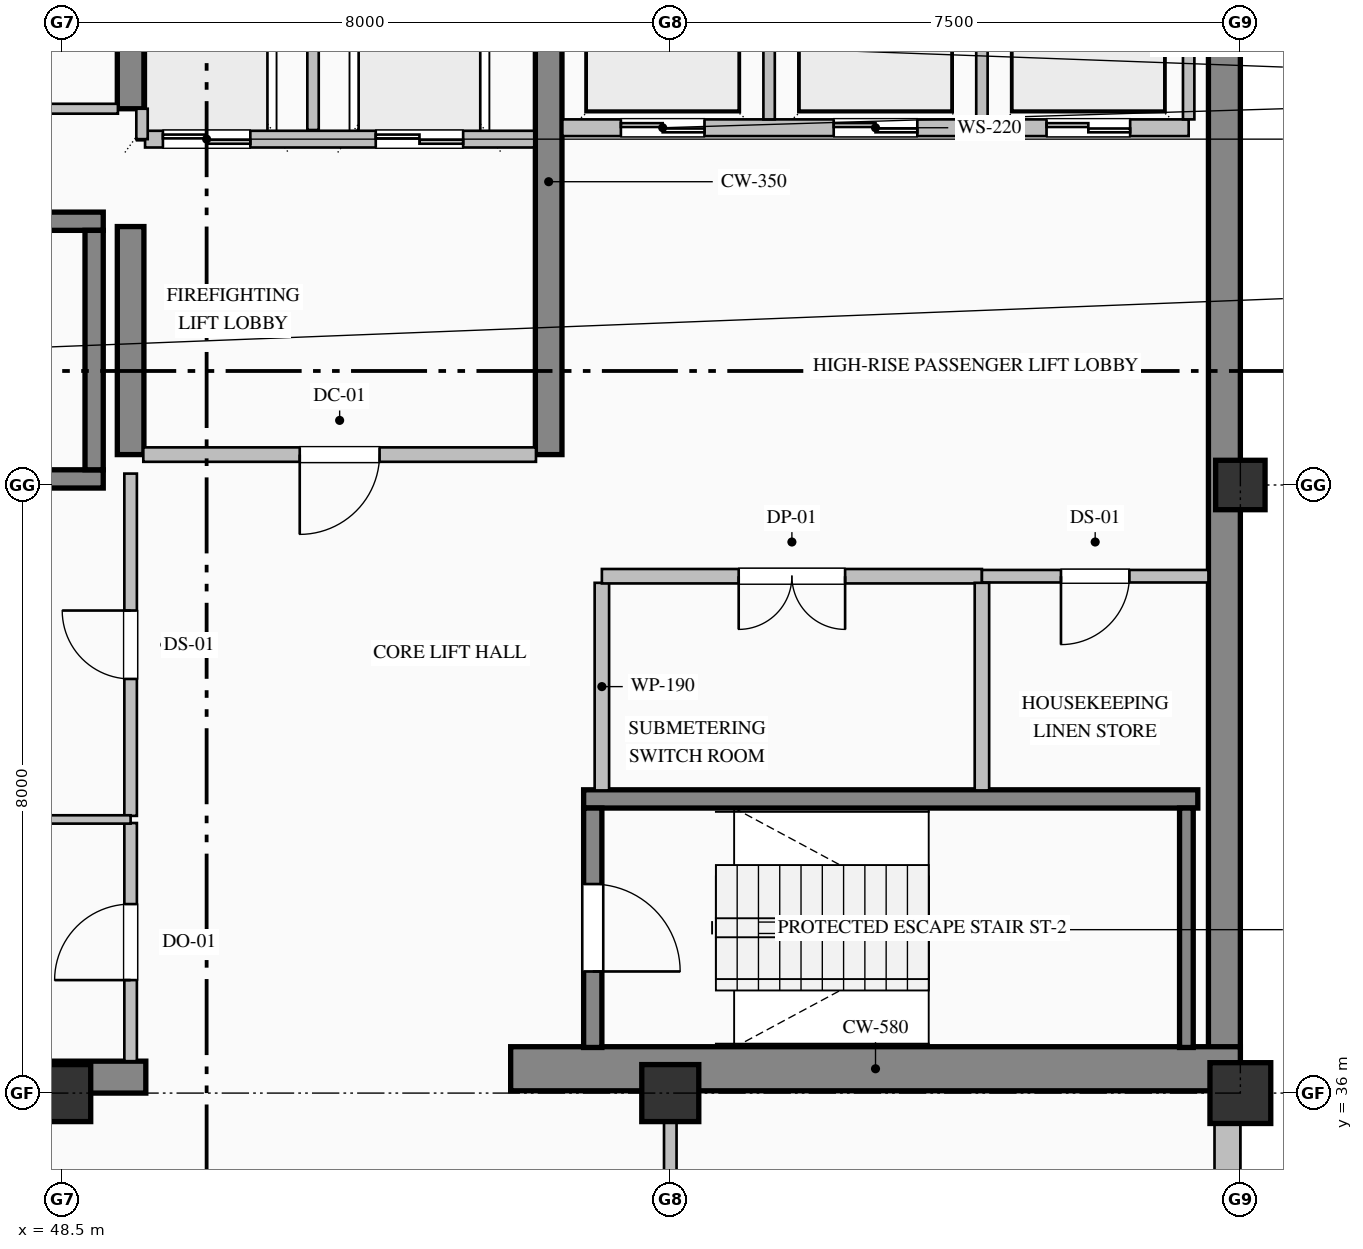
"""IFC4 building model, lengths in metres.
Left out: names, types, materials, properties, quantities, classifications, styles, units other than length and angle.
Written with IfcOpenShell. Run it as: python <this file> out.ifc"""

import sys

from ifc_helpers import new_model, si_unit, direction, frame, frame_2d, origin, origin_2d, place, context, subcontext, project, spatial, rectangle, hollow_rectangle, extrude, element, fill, save


model = new_model("IFC4")
c1 = context("Model", 3, precision=1e-05, world=origin(), true_north=direction((0.0, 1.0)))
c2 = subcontext(c1, "Body", "Model", "MODEL_VIEW")
j1 = project(units=[si_unit("LENGTHUNIT", "METRE"), si_unit("PLANEANGLEUNIT", "RADIAN")], contexts=[c1])
p1 = place(None, origin())
s1 = spatial("IfcSite", under=j1, at=p1, CompositionType="ELEMENT")
p2 = place(p1, origin())
s2 = spatial("IfcBuilding", under=s1, at=p2, CompositionType="ELEMENT")
p3 = place(p2, frame((0.0, 0.0, 343.2)))
s3 = spatial("IfcBuildingStorey", under=s2, at=p3, CompositionType="ELEMENT", Elevation=343.2)
p4 = place(p3, frame((63.79, 36.32, 0.0), z_axis=(0.0, 0.0, 1.0), x_axis=(0.0, 1.0, 0.0)))
e1 = element("IfcWall", 1, at=p4, inside=s3, PredefinedType="SHEAR", context=c2, shape_type="SweptSolid", body=[
    extrude(rectangle(XDim=15.26, YDim=0.42, at=frame_2d((7.63, 0.0))), origin(), (0.0, 0.0, 1.0), 3.785),
])
p5 = place(p3, frame((40.5, 36.21, 0.0), z_axis=(0.0, 0.0, 1.0), x_axis=(1.0, 0.0, 0.0)))
e2 = element("IfcWall", 2, at=p5, inside=s3, PredefinedType="SHEAR", context=c2, shape_type="SweptSolid", body=[
    extrude(rectangle(XDim=9.1, YDim=0.42, at=frame_2d((4.55, 0.0))), origin(), (0.0, 0.0, 1.0), 3.785),
])
p6 = place(p3, frame((54.4, 36.32, 0.0), z_axis=(0.0, 0.0, 1.0), x_axis=(1.0, 0.0, 0.0)))
e3 = element("IfcWall", 3, at=p6, inside=s3, PredefinedType="SHEAR", context=c2, shape_type="SweptSolid", body=[
    extrude(rectangle(XDim=9.6, YDim=0.58, at=frame_2d((4.8, 0.0))), origin(), (0.0, 0.0, 1.0), 4.0),
])
p7 = place(p3, frame((49.4, 44.4, 0.0), z_axis=(0.0, 0.0, 1.0), x_axis=(0.0, 1.0, 0.0)))
e4 = element("IfcWall", 4, at=p7, inside=s3, PredefinedType="SHEAR", context=c2, shape_type="SweptSolid", body=[
    extrude(rectangle(XDim=3.0, YDim=0.35, at=frame_2d((1.5, 0.0))), origin(), (0.0, 0.0, 1.0), 3.785),
])
p8 = place(p3, frame((49.4, 48.95, 0.0), z_axis=(0.0, 0.0, 1.0), x_axis=(0.0, 1.0, 0.0)))
e5 = element("IfcWall", 5, at=p8, inside=s3, PredefinedType="SHEAR", context=c2, shape_type="SweptSolid", body=[
    extrude(rectangle(XDim=2.63, YDim=0.35, at=frame_2d((1.315, 0.0))), origin(), (0.0, 0.0, 1.0), 3.785),
])
p9 = place(p3, frame((54.9, 44.4, 0.0), z_axis=(0.0, 0.0, 1.0), x_axis=(0.0, 1.0, 0.0)))
e6 = element("IfcWall", 6, at=p9, inside=s3, PredefinedType="SHEAR", context=c2, shape_type="SweptSolid", body=[
    extrude(rectangle(XDim=7.18, YDim=0.35, at=frame_2d((3.59, 0.0))), origin(), (0.0, 0.0, 1.0), 3.785),
])
for number, where, z_axis, x_axis in (
    (7, (48.5, 36.0, 0.0), (0.0, 0.0, 1.0), (1.0, 0.0, 0.0)),
    (8, (56.5, 36.0, 0.0), (0.0, 0.0, 1.0), (1.0, 0.0, 0.0)),
):
    element("IfcColumn", number, at=place(p3, frame(where, z_axis=z_axis, x_axis=x_axis)), inside=s3, PredefinedType="COLUMN", context=c2, shape_type="SweptSolid", body=[
        extrude(rectangle(XDim=0.75, YDim=0.75, at=origin_2d()), origin(), (0.0, 0.0, 1.0), 4.0),
    ])
p10 = place(p3, frame((64.0, 36.0, 0.0), z_axis=(0.0, 0.0, 1.0), x_axis=(1.0, 0.0, 0.0)))
e9 = element("IfcColumn", 9, at=p10, inside=s3, PredefinedType="COLUMN", context=c2, shape_type="SweptSolid", body=[
    extrude(hollow_rectangle(XDim=0.8, YDim=0.8, WallThickness=0.032, at=origin_2d()), origin(), (0.0, 0.0, 1.0), 4.0),
])
p11 = place(p3, frame((64.0, 44.0, 0.0), z_axis=(0.0, 0.0, 1.0), x_axis=(1.0, 0.0, 0.0)))
e10 = element("IfcColumn", 10, at=p11, inside=s3, PredefinedType="COLUMN", context=c2, shape_type="SweptSolid", body=[
    extrude(hollow_rectangle(XDim=0.65, YDim=0.65, WallThickness=0.028, at=origin_2d()), origin(), (0.0, 0.0, 1.0), 4.0),
])
p12 = place(p3, frame((63.83, 36.05, 0.0), z_axis=(0.0, 0.0, 1.0), x_axis=(0.0, -1.0, 0.0)))
e11 = element("IfcWall", 11, at=p12, inside=s3, PredefinedType="SOLIDWALL", context=c2, shape_type="SweptSolid", body=[
    extrude(rectangle(XDim=13.55, YDim=0.34, at=frame_2d((6.775, 0.0))), origin(), (0.0, 0.0, 1.0), 3.335),
])
p13 = place(p12, frame((2.925, 0.0, 0.9)))
e12 = element("IfcOpeningElement", 12, at=p13, cuts=e11, PredefinedType="OPENING", context=c2, shape_type="SweptSolid", body=[
    extrude(rectangle(XDim=1.35, YDim=1.85, at=frame_2d((0.675, 0.925))), frame((0.0, 0.18, 0.0), z_axis=(0.0, -1.0, 0.0), x_axis=(1.0, 0.0, 0.0)), (0.0, 0.0, 1.0), 0.36),
])
for number, where, z_axis, x_axis in (
    (13, (40.96, 47.47, 0.0), (0.0, 0.0, 1.0), (1.0, 0.0, 0.0)),
    (14, (49.04, 44.08, 0.0), (0.0, 0.0, 1.0), (-1.0, 0.0, 0.0)),
):
    element("IfcWall", number, at=place(p3, frame(where, z_axis=z_axis, x_axis=x_axis)), inside=s3, PredefinedType="SOLIDWALL", context=c2, shape_type="SweptSolid", body=[
        extrude(rectangle(XDim=8.08, YDim=0.24, at=frame_2d((4.04, 0.0))), origin(), (0.0, 0.0, 1.0), 4.0),
    ])
p14 = place(p3, frame((48.92, 44.2, 0.0), z_axis=(0.0, 0.0, 1.0), x_axis=(0.0, 1.0, 0.0)))
e15 = element("IfcWall", 15, at=p14, inside=s3, PredefinedType="SOLIDWALL", context=c2, shape_type="SweptSolid", body=[
    extrude(rectangle(XDim=3.15, YDim=0.24, at=frame_2d((1.575, 0.0))), origin(), (0.0, 0.0, 1.0), 4.0),
])
p15 = place(p3, frame((55.36, 39.87, 0.0), z_axis=(0.0, 0.0, 1.0), x_axis=(1.0, 0.0, 0.0)))
e16 = element("IfcWall", 16, at=p15, inside=s3, PredefinedType="SOLIDWALL", context=c2, shape_type="SweptSolid", body=[
    extrude(rectangle(XDim=8.08, YDim=0.24, at=frame_2d((4.04, 0.0))), origin(), (0.0, 0.0, 1.0), 4.0),
])
p16 = place(p3, frame((55.48, 39.75, 0.0), z_axis=(0.0, 0.0, 1.0), x_axis=(0.0, -1.0, 0.0)))
e17 = element("IfcWall", 17, at=p16, inside=s3, PredefinedType="SOLIDWALL", context=c2, shape_type="SweptSolid", body=[
    extrude(rectangle(XDim=3.15, YDim=0.24, at=frame_2d((1.575, 0.0))), origin(), (0.0, 0.0, 1.0), 4.0),
])
p17 = place(p16, frame((1.0, 0.0, 0.0)))
e18 = element("IfcOpeningElement", 18, at=p17, cuts=e17, PredefinedType="OPENING", context=c2, shape_type="SweptSolid", body=[
    extrude(rectangle(XDim=1.15, YDim=2.2, at=frame_2d((0.575, 1.1))), frame((0.0, 0.13, 0.0), z_axis=(0.0, -1.0, 0.0), x_axis=(1.0, 0.0, 0.0)), (0.0, 0.0, 1.0), 0.26),
])
p18 = place(p3, frame((63.29, 36.6, 0.0), z_axis=(0.0, 0.0, 1.0), x_axis=(0.0, 1.0, 0.0)))
e19 = element("IfcWall", 19, at=p18, inside=s3, PredefinedType="SOLIDWALL", context=c2, shape_type="SweptSolid", body=[
    extrude(rectangle(XDim=3.15, YDim=0.18, at=frame_2d((1.575, 0.0))), origin(), (0.0, 0.0, 1.0), 4.0),
])
p19 = place(p3, frame((54.71, 48.55, 0.0), z_axis=(0.0, 0.0, 1.0), x_axis=(-1.0, 0.0, 0.0)))
e20 = element("IfcWall", 20, at=p19, inside=s3, PredefinedType="PARTITIONING", context=c2, shape_type="SweptSolid", body=[
    extrude(rectangle(XDim=5.12, YDim=0.22, at=frame_2d((2.56, 0.0))), origin(), (0.0, 0.0, 1.0), 3.785),
])
p20 = place(p19, frame((3.735, 0.0, 0.0)))
e21 = element("IfcOpeningElement", 21, at=p20, cuts=e20, PredefinedType="OPENING", context=c2, shape_type="SweptSolid", body=[
    extrude(rectangle(XDim=1.15, YDim=2.2, at=frame_2d((0.575, 1.1))), frame((0.0, 0.12, 0.0), z_axis=(0.0, -1.0, 0.0), x_axis=(1.0, 0.0, 0.0)), (0.0, 0.0, 1.0), 0.24),
])
p21 = place(p19, frame((0.935, 0.0, 0.0)))
e22 = element("IfcOpeningElement", 22, at=p21, cuts=e20, PredefinedType="OPENING", context=c2, shape_type="SweptSolid", body=[
    extrude(rectangle(XDim=1.15, YDim=2.2, at=frame_2d((0.575, 1.1))), frame((0.0, 0.12, 0.0), z_axis=(0.0, -1.0, 0.0), x_axis=(1.0, 0.0, 0.0)), (0.0, 0.0, 1.0), 0.24),
])
p22 = place(p3, frame((51.8, 48.67, 0.0), z_axis=(0.0, 0.0, 1.0), x_axis=(0.0, 1.0, 0.0)))
e23 = element("IfcWall", 23, at=p22, inside=s3, PredefinedType="PARTITIONING", context=c2, shape_type="SweptSolid", body=[
    extrude(rectangle(XDim=2.91, YDim=0.15, at=frame_2d((1.455, 0.0))), origin(), (0.0, 0.0, 1.0), 3.785),
])
p23 = place(p3, frame((49.55, 48.55, 0.0), z_axis=(0.0, 0.0, 1.0), x_axis=(0.0, 1.0, 0.0)))
e24 = element("IfcWall", 24, at=p23, inside=s3, PredefinedType="PARTITIONING", context=c2, shape_type="SweptSolid", body=[
    extrude(rectangle(XDim=0.4, YDim=0.15, at=frame_2d((0.2, 0.0))), origin(), (0.0, 0.0, 1.0), 3.785),
])
p24 = place(p3, frame((63.32, 48.7, 0.0), z_axis=(0.0, 0.0, 1.0), x_axis=(-1.0, 0.0, 0.0)))
e25 = element("IfcWall", 25, at=p24, inside=s3, PredefinedType="PARTITIONING", context=c2, shape_type="SweptSolid", body=[
    extrude(rectangle(XDim=8.24, YDim=0.22, at=frame_2d((4.12, 0.0))), origin(), (0.0, 0.0, 1.0), 3.785),
])
p25 = place(p24, frame((6.37, 0.0, 0.0)))
e26 = element("IfcOpeningElement", 26, at=p25, cuts=e25, PredefinedType="OPENING", context=c2, shape_type="SweptSolid", body=[
    extrude(rectangle(XDim=1.1, YDim=2.2, at=frame_2d((0.55, 1.1))), frame((0.0, 0.12, 0.0), z_axis=(0.0, -1.0, 0.0), x_axis=(1.0, 0.0, 0.0)), (0.0, 0.0, 1.0), 0.24),
])
p26 = place(p24, frame((3.57, 0.0, 0.0)))
e27 = element("IfcOpeningElement", 27, at=p26, cuts=e25, PredefinedType="OPENING", context=c2, shape_type="SweptSolid", body=[
    extrude(rectangle(XDim=1.1, YDim=2.2, at=frame_2d((0.55, 1.1))), frame((0.0, 0.12, 0.0), z_axis=(0.0, -1.0, 0.0), x_axis=(1.0, 0.0, 0.0)), (0.0, 0.0, 1.0), 0.24),
])
p27 = place(p24, frame((0.77, 0.0, 0.0)))
e28 = element("IfcOpeningElement", 28, at=p27, cuts=e25, PredefinedType="OPENING", context=c2, shape_type="SweptSolid", body=[
    extrude(rectangle(XDim=1.1, YDim=2.2, at=frame_2d((0.55, 1.1))), frame((0.0, 0.12, 0.0), z_axis=(0.0, -1.0, 0.0), x_axis=(1.0, 0.0, 0.0)), (0.0, 0.0, 1.0), 0.24),
])
for number, where, z_axis, x_axis in (
    (29, (57.8, 48.81, 0.0), (0.0, 0.0, 1.0), (0.0, 1.0, 0.0)),
    (30, (60.6, 48.81, 0.0), (0.0, 0.0, 1.0), (0.0, 1.0, 0.0)),
    (31, (63.32, 48.81, 0.0), (0.0, 0.0, 1.0), (0.0, 1.0, 0.0)),
):
    element("IfcWall", number, at=place(p3, frame(where, z_axis=z_axis, x_axis=x_axis)), inside=s3, PredefinedType="PARTITIONING", context=c2, shape_type="SweptSolid", body=[
        extrude(rectangle(XDim=2.77, YDim=0.15, at=frame_2d((1.385, 0.0))), origin(), (0.0, 0.0, 1.0), 3.785),
    ])
p28 = place(p3, frame((43.5, 48.95, 0.0), z_axis=(0.0, 0.0, 1.0), x_axis=(1.0, 0.0, 0.0)))
e32 = element("IfcWall", 32, at=p28, inside=s3, PredefinedType="PARTITIONING", context=c2, shape_type="SweptSolid", body=[
    extrude(rectangle(XDim=5.733, YDim=0.13, at=frame_2d((2.866, 0.0))), origin(), (0.0, 0.0, 1.0), 3.785),
])
p29 = place(p28, frame((2.406, 0.0, 0.0)))
e33 = element("IfcOpeningElement", 33, at=p29, cuts=e32, PredefinedType="OPENING", context=c2, shape_type="SweptSolid", body=[
    extrude(rectangle(XDim=0.92, YDim=2.15, at=frame_2d((0.46, 1.075))), frame((0.0, 0.075, 0.0), z_axis=(0.0, -1.0, 0.0), x_axis=(1.0, 0.0, 0.0)), (0.0, 0.0, 1.0), 0.15),
])
p30 = place(p3, frame((54.733, 44.4, 0.0), z_axis=(0.0, 0.0, 1.0), x_axis=(-1.0, 0.0, 0.0)))
e34 = element("IfcWall", 34, at=p30, inside=s3, PredefinedType="PARTITIONING", context=c2, shape_type="SweptSolid", body=[
    extrude(rectangle(XDim=5.166, YDim=0.19, at=frame_2d((2.583, 0.0))), origin(), (0.0, 0.0, 1.0), 3.785),
])
p31 = place(p30, frame((2.058, 0.0, 0.0)))
e35 = element("IfcOpeningElement", 35, at=p31, cuts=e34, PredefinedType="OPENING", context=c2, shape_type="SweptSolid", body=[
    extrude(rectangle(XDim=1.05, YDim=2.15, at=frame_2d((0.525, 1.075))), frame((0.0, 0.105, 0.0), z_axis=(0.0, -1.0, 0.0), x_axis=(1.0, 0.0, 0.0)), (0.0, 0.0, 1.0), 0.21),
])
p32 = place(p3, frame((49.4, 36.42, 0.0), z_axis=(0.0, 0.0, 1.0), x_axis=(0.0, 1.0, 0.0)))
e36 = element("IfcWall", 36, at=p32, inside=s3, PredefinedType="PARTITIONING", context=c2, shape_type="SweptSolid", body=[
    extrude(rectangle(XDim=3.133, YDim=0.165, at=frame_2d((1.566, 0.0))), origin(), (0.0, 0.0, 1.0), 3.027),
])
p33 = place(p32, frame((1.066, 0.0, 0.0)))
e37 = element("IfcOpeningElement", 37, at=p33, cuts=e36, PredefinedType="OPENING", context=c2, shape_type="SweptSolid", body=[
    extrude(rectangle(XDim=1.0, YDim=2.15, at=frame_2d((0.5, 1.075))), frame((0.0, 0.093, 0.0), z_axis=(0.0, -1.0, 0.0), x_axis=(1.0, 0.0, 0.0)), (0.0, 0.0, 1.0), 0.185),
])
p34 = place(p3, frame((49.4, 39.647, 0.0), z_axis=(0.0, 0.0, 1.0), x_axis=(0.0, 1.0, 0.0)))
e38 = element("IfcWall", 38, at=p34, inside=s3, PredefinedType="PARTITIONING", context=c2, shape_type="SweptSolid", body=[
    extrude(rectangle(XDim=4.503, YDim=0.165, at=frame_2d((2.251, 0.0))), origin(), (0.0, 0.0, 1.0), 3.027),
])
p35 = place(p34, frame((1.802, 0.0, 0.0)))
e39 = element("IfcOpeningElement", 39, at=p35, cuts=e38, PredefinedType="OPENING", context=c2, shape_type="SweptSolid", body=[
    extrude(rectangle(XDim=0.9, YDim=2.15, at=frame_2d((0.45, 1.075))), frame((0.0, 0.093, 0.0), z_axis=(0.0, -1.0, 0.0), x_axis=(1.0, 0.0, 0.0)), (0.0, 0.0, 1.0), 0.185),
])
p36 = place(p3, frame((55.6, 42.713, 0.0), z_axis=(0.0, 0.0, 1.0), x_axis=(0.0, -1.0, 0.0)))
e40 = element("IfcWall", 40, at=p36, inside=s3, PredefinedType="PARTITIONING", context=c2, shape_type="SweptSolid", body=[
    extrude(rectangle(XDim=2.731, YDim=0.19, at=frame_2d((1.365, 0.0))), origin(), (0.0, 0.0, 1.0), 3.785),
])
p37 = place(p3, frame((40.92, 39.6, 0.0), z_axis=(0.0, 0.0, 1.0), x_axis=(1.0, 0.0, 0.0)))
e41 = element("IfcWall", 41, at=p37, inside=s3, PredefinedType="MOVABLE", context=c2, shape_type="SweptSolid", body=[
    extrude(rectangle(XDim=8.48, YDim=0.11, at=frame_2d((4.24, 0.0))), origin(), (0.0, 0.0, 1.0), 3.785),
])
p38 = place(p3, frame((60.6, 42.8, 0.0), z_axis=(0.0, 0.0, 1.0), x_axis=(-1.0, 0.0, 0.0)))
e42 = element("IfcWall", 42, at=p38, inside=s3, PredefinedType="PARTITIONING", context=c2, shape_type="SweptSolid", body=[
    extrude(rectangle(XDim=5.0, YDim=0.19, at=frame_2d((2.5, 0.0))), origin(), (0.0, 0.0, 1.0), 3.785),
])
p39 = place(p38, frame((1.8, 0.0, 0.0)))
e43 = element("IfcOpeningElement", 43, at=p39, cuts=e42, PredefinedType="OPENING", context=c2, shape_type="SweptSolid", body=[
    extrude(rectangle(XDim=1.4, YDim=2.25, at=frame_2d((0.7, 1.125))), frame((0.0, 0.105, 0.0), z_axis=(0.0, -1.0, 0.0), x_axis=(1.0, 0.0, 0.0)), (0.0, 0.0, 1.0), 0.21),
])
p40 = place(p3, frame((63.58, 42.8, 0.0), z_axis=(0.0, 0.0, 1.0), x_axis=(-1.0, 0.0, 0.0)))
e44 = element("IfcWall", 44, at=p40, inside=s3, PredefinedType="PARTITIONING", context=c2, shape_type="SweptSolid", body=[
    extrude(rectangle(XDim=2.98, YDim=0.165, at=frame_2d((1.49, 0.0))), origin(), (0.0, 0.0, 1.0), 3.785),
])
p41 = place(p40, frame((1.04, 0.0, 0.0)))
e45 = element("IfcOpeningElement", 45, at=p41, cuts=e44, PredefinedType="OPENING", context=c2, shape_type="SweptSolid", body=[
    extrude(rectangle(XDim=0.9, YDim=2.15, at=frame_2d((0.45, 1.075))), frame((0.0, 0.093, 0.0), z_axis=(0.0, -1.0, 0.0), x_axis=(1.0, 0.0, 0.0)), (0.0, 0.0, 1.0), 0.185),
])
p42 = place(p3, frame((60.6, 42.713, 0.0), z_axis=(0.0, 0.0, 1.0), x_axis=(0.0, -1.0, 0.0)))
e46 = element("IfcWall", 46, at=p42, inside=s3, PredefinedType="PARTITIONING", context=c2, shape_type="SweptSolid", body=[
    extrude(rectangle(XDim=2.731, YDim=0.19, at=frame_2d((1.365, 0.0))), origin(), (0.0, 0.0, 1.0), 3.785),
])
p43 = place(p3, frame((56.5, 36.0, 0.0), z_axis=(0.0, 0.0, 1.0), x_axis=(0.0, -1.0, 0.0)))
e47 = element("IfcWall", 47, at=p43, inside=s3, PredefinedType="PARTITIONING", context=c2, shape_type="SweptSolid", body=[
    extrude(rectangle(XDim=2.325, YDim=0.165, at=frame_2d((1.163, 0.0))), origin(), (0.0, 0.0, 1.0), 3.177),
])
p44 = place(p17, origin())
e48 = element("IfcDoor", 48, at=p44, inside=s3, OperationType="SINGLE_SWING_RIGHT", PredefinedType="DOOR", context=c2, shape_type="SweptSolid", body=[
    extrude(rectangle(XDim=1.15, YDim=2.2, at=frame_2d((0.575, 1.1))), frame((0.0, 0.025, 0.0), z_axis=(0.0, -1.0, 0.0), x_axis=(1.0, 0.0, 0.0)), (0.0, 0.0, 1.0), 0.05),
])
fill(e18, e48)
p45 = place(p20, origin())
e49 = element("IfcDoor", 49, at=p45, inside=s3, OperationType="DOUBLE_DOOR_SLIDING", PredefinedType="DOOR", context=c2, shape_type="SweptSolid", body=[
    extrude(rectangle(XDim=1.15, YDim=2.2, at=frame_2d((0.575, 1.1))), frame((0.0, 0.025, 0.0), z_axis=(0.0, -1.0, 0.0), x_axis=(1.0, 0.0, 0.0)), (0.0, 0.0, 1.0), 0.05),
])
fill(e21, e49)
p46 = place(p21, origin())
e50 = element("IfcDoor", 50, at=p46, inside=s3, OperationType="DOUBLE_DOOR_SLIDING", PredefinedType="DOOR", context=c2, shape_type="SweptSolid", body=[
    extrude(rectangle(XDim=1.15, YDim=2.2, at=frame_2d((0.575, 1.1))), frame((0.0, 0.025, 0.0), z_axis=(0.0, -1.0, 0.0), x_axis=(1.0, 0.0, 0.0)), (0.0, 0.0, 1.0), 0.05),
])
fill(e22, e50)
p47 = place(p25, origin())
e51 = element("IfcDoor", 51, at=p47, inside=s3, OperationType="DOUBLE_DOOR_SLIDING", PredefinedType="DOOR", context=c2, shape_type="SweptSolid", body=[
    extrude(rectangle(XDim=1.1, YDim=2.2, at=frame_2d((0.55, 1.1))), frame((0.0, 0.025, 0.0), z_axis=(0.0, -1.0, 0.0), x_axis=(1.0, 0.0, 0.0)), (0.0, 0.0, 1.0), 0.05),
])
fill(e26, e51)
p48 = place(p26, origin())
e52 = element("IfcDoor", 52, at=p48, inside=s3, OperationType="DOUBLE_DOOR_SLIDING", PredefinedType="DOOR", context=c2, shape_type="SweptSolid", body=[
    extrude(rectangle(XDim=1.1, YDim=2.2, at=frame_2d((0.55, 1.1))), frame((0.0, 0.025, 0.0), z_axis=(0.0, -1.0, 0.0), x_axis=(1.0, 0.0, 0.0)), (0.0, 0.0, 1.0), 0.05),
])
fill(e27, e52)
p49 = place(p27, origin())
e53 = element("IfcDoor", 53, at=p49, inside=s3, OperationType="DOUBLE_DOOR_SLIDING", PredefinedType="DOOR", context=c2, shape_type="SweptSolid", body=[
    extrude(rectangle(XDim=1.1, YDim=2.2, at=frame_2d((0.55, 1.1))), frame((0.0, 0.025, 0.0), z_axis=(0.0, -1.0, 0.0), x_axis=(1.0, 0.0, 0.0)), (0.0, 0.0, 1.0), 0.05),
])
fill(e28, e53)
p50 = place(p31, origin())
e54 = element("IfcDoor", 54, at=p50, inside=s3, OperationType="SINGLE_SWING_RIGHT", PredefinedType="DOOR", context=c2, shape_type="SweptSolid", body=[
    extrude(rectangle(XDim=1.05, YDim=2.15, at=frame_2d((0.525, 1.075))), frame((0.0, 0.025, 0.0), z_axis=(0.0, -1.0, 0.0), x_axis=(1.0, 0.0, 0.0)), (0.0, 0.0, 1.0), 0.05),
])
fill(e35, e54)
p51 = place(p33, origin())
e55 = element("IfcDoor", 55, at=p51, inside=s3, OperationType="SINGLE_SWING_LEFT", PredefinedType="DOOR", context=c2, shape_type="SweptSolid", body=[
    extrude(rectangle(XDim=1.0, YDim=2.15, at=frame_2d((0.5, 1.075))), frame((0.0, 0.025, 0.0), z_axis=(0.0, -1.0, 0.0), x_axis=(1.0, 0.0, 0.0)), (0.0, 0.0, 1.0), 0.05),
])
fill(e37, e55)
p52 = place(p35, origin())
e56 = element("IfcDoor", 56, at=p52, inside=s3, OperationType="SINGLE_SWING_RIGHT", PredefinedType="DOOR", context=c2, shape_type="SweptSolid", body=[
    extrude(rectangle(XDim=0.9, YDim=2.15, at=frame_2d((0.45, 1.075))), frame((0.0, 0.025, 0.0), z_axis=(0.0, -1.0, 0.0), x_axis=(1.0, 0.0, 0.0)), (0.0, 0.0, 1.0), 0.05),
])
fill(e39, e56)
p53 = place(p39, origin())
e57 = element("IfcDoor", 57, at=p53, inside=s3, OperationType="DOUBLE_DOOR_SINGLE_SWING", PredefinedType="DOOR", context=c2, shape_type="SweptSolid", body=[
    extrude(rectangle(XDim=1.4, YDim=2.25, at=frame_2d((0.7, 1.125))), frame((0.0, 0.025, 0.0), z_axis=(0.0, -1.0, 0.0), x_axis=(1.0, 0.0, 0.0)), (0.0, 0.0, 1.0), 0.05),
])
fill(e43, e57)
p54 = place(p41, origin())
e58 = element("IfcDoor", 58, at=p54, inside=s3, OperationType="SINGLE_SWING_RIGHT", PredefinedType="DOOR", context=c2, shape_type="SweptSolid", body=[
    extrude(rectangle(XDim=0.9, YDim=2.15, at=frame_2d((0.45, 1.075))), frame((0.0, 0.025, 0.0), z_axis=(0.0, -1.0, 0.0), x_axis=(1.0, 0.0, 0.0)), (0.0, 0.0, 1.0), 0.05),
])
fill(e45, e58)
save(model, sys.argv[1])
